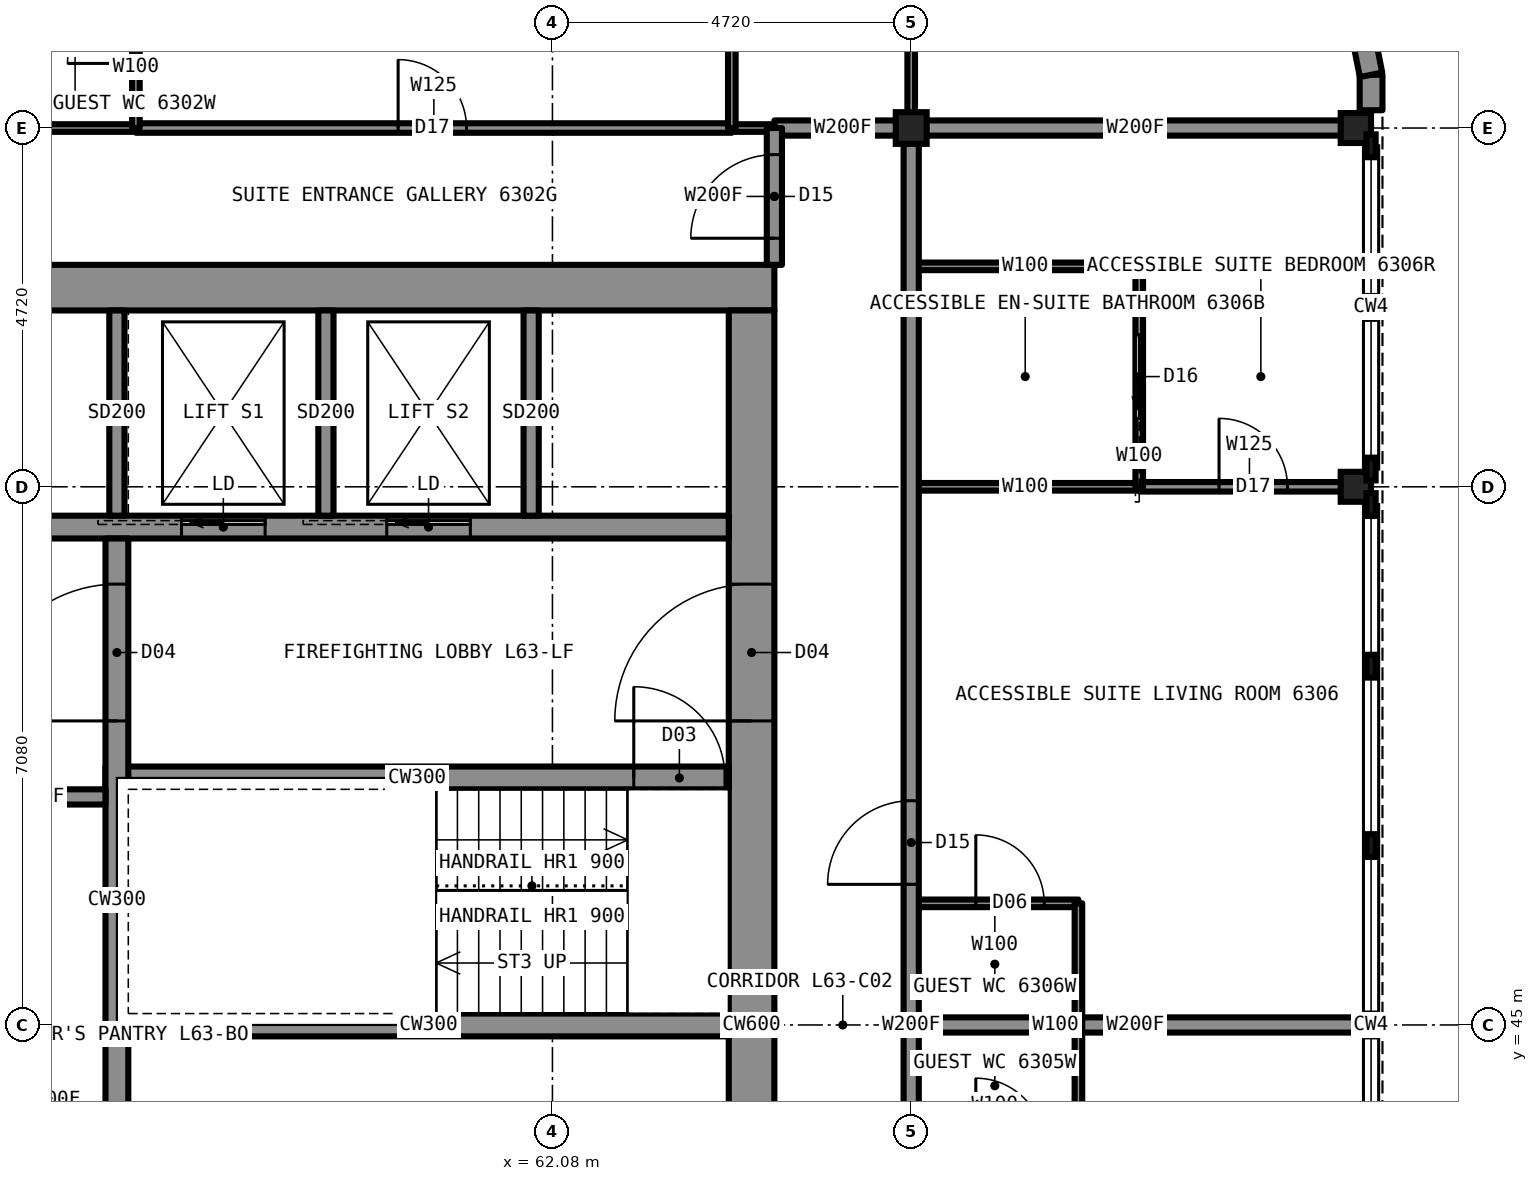
"""IFC4 building model, lengths in metres.
Left out: names, types, materials, properties, quantities, classifications, styles, units other than length and angle.
Written with IfcOpenShell. Run it as: python <this file> out.ifc"""

import sys

from ifc_helpers import new_model, si_unit, direction, frame, frame_2d, origin, origin_2d, place, context, subcontext, project, spatial, rectangle, i_section, extrude, element, fill, save


model = new_model("IFC4")
c1 = context("Model", 3, precision=1e-05, world=origin(), true_north=direction((0.0, 1.0)))
c2 = subcontext(c1, "Body", "Model", "MODEL_VIEW")
j1 = project(units=[si_unit("LENGTHUNIT", "METRE"), si_unit("PLANEANGLEUNIT", "RADIAN")], contexts=[c1])
p1 = place(None, origin())
s1 = spatial("IfcSite", under=j1, at=p1, CompositionType="ELEMENT")
p2 = place(p1, origin())
s2 = spatial("IfcBuilding", under=s1, at=p2, CompositionType="ELEMENT")
p3 = place(p2, frame((0.0, 0.0, 226.7)))
s3 = spatial("IfcBuildingStorey", under=s2, at=p3, CompositionType="ELEMENT", Elevation=226.7)
for number, where, z_axis, x_axis in (
    (1, (72.65, 52.08, 0.0), (0.0, 0.0, 1.0), (1.0, 0.0, 0.0)),
    (2, (72.65, 56.8, 0.0), (0.0, 0.0, 1.0), (1.0, 0.0, 0.0)),
):
    element("IfcColumn", number, at=place(p3, frame(where, z_axis=z_axis, x_axis=x_axis)), inside=s3, PredefinedType="COLUMN", context=c2, shape_type="SweptSolid", body=[
        extrude(i_section(OverallWidth=0.442, OverallDepth=0.531, WebThickness=0.066, FlangeThickness=0.106, at=origin_2d()), origin(), (0.0, 0.0, 1.0), 3.5),
    ])
p4 = place(p3, frame((66.8, 56.8, 0.0), z_axis=(0.0, 0.0, 1.0), x_axis=(1.0, 0.0, 0.0)))
e3 = element("IfcColumn", 3, at=p4, inside=s3, PredefinedType="COLUMN", context=c2, shape_type="SweptSolid", body=[
    extrude(i_section(OverallWidth=0.406, OverallDepth=0.417, WebThickness=0.03, FlangeThickness=0.048, at=origin_2d()), origin(), (0.0, 0.0, 1.0), 3.5),
])
p5 = place(p3, frame((45.0, 54.7, 0.0), z_axis=(0.0, 0.0, 1.0), x_axis=(1.0, 0.0, 0.0)))
e4 = element("IfcWall", 4, at=p5, inside=s3, PredefinedType="SHEAR", context=c2, shape_type="SweptSolid", body=[
    extrude(rectangle(XDim=20.0, YDim=0.6, at=frame_2d((10.0, 0.0))), origin(), (0.0, 0.0, 1.0), 3.5),
])
p6 = place(p3, frame((64.7, 35.6, 0.0), z_axis=(0.0, 0.0, 1.0), x_axis=(0.0, 1.0, 0.0)))
e5 = element("IfcWall", 5, at=p6, inside=s3, PredefinedType="SHEAR", context=c2, shape_type="SweptSolid", body=[
    extrude(rectangle(XDim=18.8, YDim=0.6, at=frame_2d((9.4, 0.0))), origin(), (0.0, 0.0, 1.0), 3.5),
])
p7 = place(p6, frame((13.4, 0.0, 0.0)))
e6 = element("IfcOpeningElement", 6, at=p7, cuts=e5, PredefinedType="OPENING", context=c2, shape_type="SweptSolid", body=[
    extrude(rectangle(XDim=1.8, YDim=2.2, at=frame_2d((0.9, 1.1))), frame((0.0, 0.31, 0.0), z_axis=(0.0, -1.0, 0.0), x_axis=(1.0, 0.0, 0.0)), (0.0, 0.0, 1.0), 0.62),
])
p8 = place(p6, frame((3.6, 0.0, 0.0)))
e7 = element("IfcOpeningElement", 7, at=p8, cuts=e5, PredefinedType="OPENING", context=c2, shape_type="SweptSolid", body=[
    extrude(rectangle(XDim=1.8, YDim=2.2, at=frame_2d((0.9, 1.1))), frame((0.0, 0.31, 0.0), z_axis=(0.0, -1.0, 0.0), x_axis=(1.0, 0.0, 0.0)), (0.0, 0.0, 1.0), 0.62),
])
p9 = place(p3, frame((45.6, 51.55, 0.0), z_axis=(0.0, 0.0, 1.0), x_axis=(1.0, 0.0, 0.0)))
e8 = element("IfcWall", 8, at=p9, inside=s3, PredefinedType="SHEAR", context=c2, shape_type="SweptSolid", body=[
    extrude(rectangle(XDim=18.8, YDim=0.3, at=frame_2d((9.4, 0.0))), origin(), (0.0, 0.0, 1.0), 3.5),
])
p10 = place(p9, frame((4.8, 0.0, 0.0)))
e9 = element("IfcOpeningElement", 9, at=p10, cuts=e8, PredefinedType="OPENING", context=c2, shape_type="SweptSolid", body=[
    extrude(rectangle(XDim=1.0, YDim=2.1, at=frame_2d((0.5, 1.05))), frame((0.0, 0.16, 0.0), z_axis=(0.0, -1.0, 0.0), x_axis=(1.0, 0.0, 0.0)), (0.0, 0.0, 1.0), 0.32),
])
p11 = place(p9, frame((11.6, 0.0, 0.0)))
e10 = element("IfcOpeningElement", 10, at=p11, cuts=e8, PredefinedType="OPENING", context=c2, shape_type="SweptSolid", body=[
    extrude(rectangle(XDim=1.1, YDim=2.2, at=frame_2d((0.55, 1.1))), frame((0.0, 0.16, 0.0), z_axis=(0.0, -1.0, 0.0), x_axis=(1.0, 0.0, 0.0)), (0.0, 0.0, 1.0), 0.32),
])
p12 = place(p9, frame((14.3, 0.0, 0.0)))
e11 = element("IfcOpeningElement", 11, at=p12, cuts=e8, PredefinedType="OPENING", context=c2, shape_type="SweptSolid", body=[
    extrude(rectangle(XDim=1.1, YDim=2.2, at=frame_2d((0.55, 1.1))), frame((0.0, 0.16, 0.0), z_axis=(0.0, -1.0, 0.0), x_axis=(1.0, 0.0, 0.0)), (0.0, 0.0, 1.0), 0.32),
])
p13 = place(p3, frame((56.2, 48.25, 0.0), z_axis=(0.0, 0.0, 1.0), x_axis=(1.0, 0.0, 0.0)))
e12 = element("IfcWall", 12, at=p13, inside=s3, PredefinedType="SHEAR", context=c2, shape_type="SweptSolid", body=[
    extrude(rectangle(XDim=8.2, YDim=0.3, at=frame_2d((4.1, 0.0))), origin(), (0.0, 0.0, 1.0), 3.5),
])
p14 = place(p13, frame((6.95, 0.0, 0.0)))
e13 = element("IfcOpeningElement", 13, at=p14, cuts=e12, PredefinedType="OPENING", context=c2, shape_type="SweptSolid", body=[
    extrude(rectangle(XDim=1.2, YDim=2.2, at=frame_2d((0.6, 1.1))), frame((0.0, 0.16, 0.0), z_axis=(0.0, -1.0, 0.0), x_axis=(1.0, 0.0, 0.0)), (0.0, 0.0, 1.0), 0.32),
])
p15 = place(p3, frame((56.35, 41.9, 0.0), z_axis=(0.0, 0.0, 1.0), x_axis=(0.0, 1.0, 0.0)))
e14 = element("IfcWall", 14, at=p15, inside=s3, PredefinedType="SHEAR", context=c2, shape_type="SweptSolid", body=[
    extrude(rectangle(XDim=9.5, YDim=0.3, at=frame_2d((4.75, 0.0))), origin(), (0.0, 0.0, 1.0), 3.5),
])
p16 = place(p15, frame((7.1, 0.0, 0.0)))
e15 = element("IfcOpeningElement", 15, at=p16, cuts=e14, PredefinedType="OPENING", context=c2, shape_type="SweptSolid", body=[
    extrude(rectangle(XDim=1.8, YDim=2.2, at=frame_2d((0.9, 1.1))), frame((0.0, 0.16, 0.0), z_axis=(0.0, -1.0, 0.0), x_axis=(1.0, 0.0, 0.0)), (0.0, 0.0, 1.0), 0.32),
])
p17 = place(p3, frame((56.5, 45.0, 0.0), z_axis=(0.0, 0.0, 1.0), x_axis=(1.0, 0.0, 0.0)))
e16 = element("IfcWall", 16, at=p17, inside=s3, PredefinedType="SHEAR", context=c2, shape_type="SweptSolid", body=[
    extrude(rectangle(XDim=7.9, YDim=0.3, at=frame_2d((3.95, 0.0))), origin(), (0.0, 0.0, 1.0), 3.5),
])
p18 = place(p3, frame((66.8, 45.0, 0.0), z_axis=(0.0, 0.0, 1.0), x_axis=(1.0, 0.0, 0.0)))
e17 = element("IfcWall", 17, at=p18, inside=s3, PredefinedType="PARTITIONING", context=c2, shape_type="SweptSolid", body=[
    extrude(rectangle(XDim=5.9, YDim=0.2, at=frame_2d((2.95, 0.0))), origin(), (0.0, 0.0, 1.0), 2.797),
])
p19 = place(p3, frame((66.8, 46.6, 0.0), z_axis=(0.0, 0.0, 1.0), x_axis=(1.0, 0.0, 0.0)))
e18 = element("IfcWall", 18, at=p19, inside=s3, PredefinedType="PARTITIONING", context=c2, shape_type="SweptSolid", body=[
    extrude(rectangle(XDim=2.2, YDim=0.1, at=frame_2d((1.1, 0.0))), origin(), (0.0, 0.0, 1.0), 3.33),
])
p20 = place(p19, frame((0.85, 0.0, 0.0)))
e19 = element("IfcOpeningElement", 19, at=p20, cuts=e18, PredefinedType="OPENING", context=c2, shape_type="SweptSolid", body=[
    extrude(rectangle(XDim=0.9, YDim=2.1, at=frame_2d((0.45, 1.05))), frame((0.0, 0.06, 0.0), z_axis=(0.0, -1.0, 0.0), x_axis=(1.0, 0.0, 0.0)), (0.0, 0.0, 1.0), 0.12),
])
p21 = place(p3, frame((53.4, 56.8, 0.0), z_axis=(0.0, 0.0, 1.0), x_axis=(1.0, 0.0, 0.0)))
e20 = element("IfcWall", 20, at=p21, inside=s3, PredefinedType="PARTITIONING", context=c2, shape_type="SweptSolid", body=[
    extrude(rectangle(XDim=3.2, YDim=0.1, at=frame_2d((1.6, 0.0))), origin(), (0.0, 0.0, 1.0), 3.33),
])
p22 = place(p3, frame((64.44, 56.8, 0.0), z_axis=(0.0, 0.0, 1.0), x_axis=(1.0, 0.0, 0.0)))
e21 = element("IfcWall", 21, at=p22, inside=s3, PredefinedType="PARTITIONING", context=c2, shape_type="SweptSolid", body=[
    extrude(rectangle(XDim=0.56, YDim=0.1, at=frame_2d((0.28, 0.0))), origin(), (0.0, 0.0, 1.0), 3.33),
])
p23 = place(p3, frame((65.0, 56.8, 0.0), z_axis=(0.0, 0.0, 1.0), x_axis=(1.0, 0.0, 0.0)))
e22 = element("IfcWall", 22, at=p23, inside=s3, PredefinedType="PARTITIONING", context=c2, shape_type="SweptSolid", body=[
    extrude(rectangle(XDim=1.8, YDim=0.2, at=frame_2d((0.9, 0.0))), origin(), (0.0, 0.0, 1.0), 3.33),
])
p24 = place(p3, frame((66.8, 56.8, 0.0), z_axis=(0.0, 0.0, 1.0), x_axis=(1.0, 0.0, 0.0)))
e23 = element("IfcWall", 23, at=p24, inside=s3, PredefinedType="PARTITIONING", context=c2, shape_type="SweptSolid", body=[
    extrude(rectangle(XDim=5.9, YDim=0.2, at=frame_2d((2.95, 0.0))), origin(), (0.0, 0.0, 1.0), 2.573),
])
p25 = place(p3, frame((56.6, 56.8, 0.0), z_axis=(0.0, 0.0, 1.0), x_axis=(1.0, 0.0, 0.0)))
e24 = element("IfcWall", 24, at=p25, inside=s3, PredefinedType="PARTITIONING", context=c2, shape_type="SweptSolid", body=[
    extrude(rectangle(XDim=7.84, YDim=0.125, at=frame_2d((3.92, 0.0))), origin(), (0.0, 0.0, 1.0), 3.33),
])
p26 = place(p25, frame((3.45, 0.0, 0.0)))
e25 = element("IfcOpeningElement", 25, at=p26, cuts=e24, PredefinedType="OPENING", context=c2, shape_type="SweptSolid", body=[
    extrude(rectangle(XDim=0.9, YDim=2.2, at=frame_2d((0.45, 1.1))), frame((0.0, 0.073, 0.0), z_axis=(0.0, -1.0, 0.0), x_axis=(1.0, 0.0, 0.0)), (0.0, 0.0, 1.0), 0.145),
])
p27 = place(p3, frame((66.8, 52.08, 0.0), z_axis=(0.0, 0.0, 1.0), x_axis=(1.0, 0.0, 0.0)))
e26 = element("IfcWall", 26, at=p27, inside=s3, PredefinedType="PARTITIONING", context=c2, shape_type="SweptSolid", body=[
    extrude(rectangle(XDim=3.0, YDim=0.1, at=frame_2d((1.5, 0.0))), origin(), (0.0, 0.0, 1.0), 2.573),
])
p28 = place(p3, frame((69.8, 52.08, 0.0), z_axis=(0.0, 0.0, 1.0), x_axis=(1.0, 0.0, 0.0)))
e27 = element("IfcWall", 27, at=p28, inside=s3, PredefinedType="PARTITIONING", context=c2, shape_type="SweptSolid", body=[
    extrude(rectangle(XDim=2.9, YDim=0.125, at=frame_2d((1.45, 0.0))), origin(), (0.0, 0.0, 1.0), 2.573),
])
p29 = place(p28, frame((1.05, 0.0, 0.0)))
e28 = element("IfcOpeningElement", 28, at=p29, cuts=e27, PredefinedType="OPENING", context=c2, shape_type="SweptSolid", body=[
    extrude(rectangle(XDim=0.9, YDim=2.2, at=frame_2d((0.45, 1.1))), frame((0.0, 0.073, 0.0), z_axis=(0.0, -1.0, 0.0), x_axis=(1.0, 0.0, 0.0)), (0.0, 0.0, 1.0), 0.145),
])
p30 = place(p3, frame((66.8, 54.98, 0.0), z_axis=(0.0, 0.0, 1.0), x_axis=(1.0, 0.0, 0.0)))
e29 = element("IfcWall", 29, at=p30, inside=s3, PredefinedType="PARTITIONING", context=c2, shape_type="SweptSolid", body=[
    extrude(rectangle(XDim=3.0, YDim=0.1, at=frame_2d((1.5, 0.0))), origin(), (0.0, 0.0, 1.0), 3.33),
])
p31 = place(p3, frame((56.6, 56.8, 0.0), z_axis=(0.0, 0.0, 1.0), x_axis=(0.0, 1.0, 0.0)))
e30 = element("IfcWall", 30, at=p31, inside=s3, PredefinedType="PARTITIONING", context=c2, shape_type="SweptSolid", body=[
    extrude(rectangle(XDim=2.2, YDim=0.1, at=frame_2d((1.1, 0.0))), origin(), (0.0, 0.0, 1.0), 3.33),
])
p32 = place(p31, frame((0.85, 0.0, 0.0)))
e31 = element("IfcOpeningElement", 31, at=p32, cuts=e30, PredefinedType="OPENING", context=c2, shape_type="SweptSolid", body=[
    extrude(rectangle(XDim=0.9, YDim=2.1, at=frame_2d((0.45, 1.05))), frame((0.0, 0.06, 0.0), z_axis=(0.0, -1.0, 0.0), x_axis=(1.0, 0.0, 0.0)), (0.0, 0.0, 1.0), 0.12),
])
p33 = place(p3, frame((65.0, 55.0, 0.0), z_axis=(0.0, 0.0, 1.0), x_axis=(0.0, 1.0, 0.0)))
e32 = element("IfcWall", 32, at=p33, inside=s3, PredefinedType="PARTITIONING", context=c2, shape_type="SweptSolid", body=[
    extrude(rectangle(XDim=1.8, YDim=0.2, at=frame_2d((0.9, 0.0))), origin(), (0.0, 0.0, 1.0), 3.33),
])
p34 = place(p33, frame((0.35, 0.0, 0.0)))
e33 = element("IfcOpeningElement", 33, at=p34, cuts=e32, PredefinedType="OPENING", context=c2, shape_type="SweptSolid", body=[
    extrude(rectangle(XDim=1.1, YDim=2.2, at=frame_2d((0.55, 1.1))), frame((0.0, 0.11, 0.0), z_axis=(0.0, -1.0, 0.0), x_axis=(1.0, 0.0, 0.0)), (0.0, 0.0, 1.0), 0.22),
])
p35 = place(p3, frame((66.8, 56.8, 0.0), z_axis=(0.0, 0.0, 1.0), x_axis=(0.0, 1.0, 0.0)))
e34 = element("IfcWall", 34, at=p35, inside=s3, PredefinedType="PARTITIONING", context=c2, shape_type="SweptSolid", body=[
    extrude(rectangle(XDim=2.8, YDim=0.1, at=frame_2d((1.4, 0.0))), origin(), (0.0, 0.0, 1.0), 2.573),
])
p36 = place(p3, frame((66.8, 33.2, 0.0), z_axis=(0.0, 0.0, 1.0), x_axis=(0.0, 1.0, 0.0)))
e35 = element("IfcWall", 35, at=p36, inside=s3, PredefinedType="PARTITIONING", context=c2, shape_type="SweptSolid", body=[
    extrude(rectangle(XDim=23.6, YDim=0.2, at=frame_2d((11.8, 0.0))), origin(), (0.0, 0.0, 1.0), 3.33),
])
p37 = place(p36, frame((8.85, 0.0, 0.0)))
e36 = element("IfcOpeningElement", 36, at=p37, cuts=e35, PredefinedType="OPENING", context=c2, shape_type="SweptSolid", body=[
    extrude(rectangle(XDim=1.1, YDim=2.2, at=frame_2d((0.55, 1.1))), frame((0.0, 0.11, 0.0), z_axis=(0.0, -1.0, 0.0), x_axis=(1.0, 0.0, 0.0)), (0.0, 0.0, 1.0), 0.22),
])
p38 = place(p36, frame((13.65, 0.0, 0.0)))
e37 = element("IfcOpeningElement", 37, at=p38, cuts=e35, PredefinedType="OPENING", context=c2, shape_type="SweptSolid", body=[
    extrude(rectangle(XDim=1.1, YDim=2.2, at=frame_2d((0.55, 1.1))), frame((0.0, 0.11, 0.0), z_axis=(0.0, -1.0, 0.0), x_axis=(1.0, 0.0, 0.0)), (0.0, 0.0, 1.0), 0.22),
])
p39 = place(p3, frame((69.0, 43.4, 0.0), z_axis=(0.0, 0.0, 1.0), x_axis=(0.0, 1.0, 0.0)))
e38 = element("IfcWall", 38, at=p39, inside=s3, PredefinedType="PARTITIONING", context=c2, shape_type="SweptSolid", body=[
    extrude(rectangle(XDim=3.2, YDim=0.1, at=frame_2d((1.6, 0.0))), origin(), (0.0, 0.0, 1.0), 3.33),
])
p40 = place(p3, frame((69.8, 52.08, 0.0), z_axis=(0.0, 0.0, 1.0), x_axis=(0.0, 1.0, 0.0)))
e39 = element("IfcWall", 39, at=p40, inside=s3, PredefinedType="PARTITIONING", context=c2, shape_type="SweptSolid", body=[
    extrude(rectangle(XDim=2.9, YDim=0.1, at=frame_2d((1.45, 0.0))), origin(), (0.0, 0.0, 1.0), 3.33),
])
p41 = place(p40, frame((0.9, 0.0, 0.0)))
e40 = element("IfcOpeningElement", 40, at=p41, cuts=e39, PredefinedType="OPENING", context=c2, shape_type="SweptSolid", body=[
    extrude(rectangle(XDim=1.1, YDim=2.1, at=frame_2d((0.55, 1.05))), frame((0.0, 0.06, 0.0), z_axis=(0.0, -1.0, 0.0), x_axis=(1.0, 0.0, 0.0)), (0.0, 0.0, 1.0), 0.12),
])
p42 = place(p3, frame((64.44, 56.8, 0.0), z_axis=(0.0, 0.0, 1.0), x_axis=(0.0, 1.0, 0.0)))
e41 = element("IfcWall", 41, at=p42, inside=s3, PredefinedType="PARTITIONING", context=c2, shape_type="SweptSolid", body=[
    extrude(rectangle(XDim=2.8, YDim=0.1, at=frame_2d((1.4, 0.0))), origin(), (0.0, 0.0, 1.0), 3.33),
])
for number, where, z_axis, x_axis in (
    (42, (54.35, 44.3, 0.0), (0.0, 0.0, 1.0), (1.0, 0.0, 0.0)),
    (43, (54.35, 44.7, 0.0), (0.0, 0.0, 1.0), (1.0, 0.0, 0.0)),
    (44, (54.35, 48.0, 0.0), (0.0, 0.0, 1.0), (1.0, 0.0, 0.0)),
):
    element("IfcWall", number, at=place(p3, frame(where, z_axis=z_axis, x_axis=x_axis)), inside=s3, PredefinedType="PARTITIONING", context=c2, shape_type="SweptSolid", body=[
        extrude(rectangle(XDim=1.85, YDim=0.2, at=frame_2d((0.925, 0.0))), origin(), (0.0, 0.0, 1.0), 3.33),
    ])
for number, where, z_axis, x_axis in (
    (45, (59.1, 51.7, 0.0), (0.0, 0.0, 1.0), (0.0, 1.0, 0.0)),
    (46, (61.8, 51.7, 0.0), (0.0, 0.0, 1.0), (0.0, 1.0, 0.0)),
    (47, (56.35, 51.7, 0.0), (0.0, 0.0, 1.0), (0.0, 1.0, 0.0)),
):
    element("IfcWall", number, at=place(p3, frame(where, z_axis=z_axis, x_axis=x_axis)), inside=s3, PredefinedType="PARTITIONING", context=c2, shape_type="SweptSolid", body=[
        extrude(rectangle(XDim=2.7, YDim=0.2, at=frame_2d((1.35, 0.0))), origin(), (0.0, 0.0, 1.0), 3.33),
    ])
p43 = place(p26, origin())
e48 = element("IfcDoor", 48, at=p43, inside=s3, OperationType="SINGLE_SWING_LEFT", PredefinedType="DOOR", context=c2, shape_type="SweptSolid", body=[
    extrude(rectangle(XDim=0.9, YDim=2.2, at=frame_2d((0.45, 1.1))), frame((0.0, 0.025, 0.0), z_axis=(0.0, -1.0, 0.0), x_axis=(1.0, 0.0, 0.0)), (0.0, 0.0, 1.0), 0.05),
])
fill(e25, e48)
p44 = place(p34, origin())
e49 = element("IfcDoor", 49, at=p44, inside=s3, OperationType="SINGLE_SWING_LEFT", PredefinedType="DOOR", context=c2, shape_type="SweptSolid", body=[
    extrude(rectangle(XDim=1.1, YDim=2.2, at=frame_2d((0.55, 1.1))), frame((0.0, 0.025, 0.0), z_axis=(0.0, -1.0, 0.0), x_axis=(1.0, 0.0, 0.0)), (0.0, 0.0, 1.0), 0.05),
])
fill(e33, e49)
p45 = place(p32, origin())
e50 = element("IfcDoor", 50, at=p45, inside=s3, OperationType="SINGLE_SWING_LEFT", PredefinedType="DOOR", context=c2, shape_type="SweptSolid", body=[
    extrude(rectangle(XDim=0.9, YDim=2.1, at=frame_2d((0.45, 1.05))), frame((0.0, 0.025, 0.0), z_axis=(0.0, -1.0, 0.0), x_axis=(1.0, 0.0, 0.0)), (0.0, 0.0, 1.0), 0.05),
])
fill(e31, e50)
p46 = place(p38, origin())
e51 = element("IfcDoor", 51, at=p46, inside=s3, OperationType="SINGLE_SWING_LEFT", PredefinedType="DOOR", context=c2, shape_type="SweptSolid", body=[
    extrude(rectangle(XDim=1.1, YDim=2.2, at=frame_2d((0.55, 1.1))), frame((0.0, 0.025, 0.0), z_axis=(0.0, -1.0, 0.0), x_axis=(1.0, 0.0, 0.0)), (0.0, 0.0, 1.0), 0.05),
])
fill(e37, e51)
p47 = place(p41, origin())
e52 = element("IfcDoor", 52, at=p47, inside=s3, OperationType="SLIDING_TO_LEFT", PredefinedType="DOOR", context=c2, shape_type="SweptSolid", body=[
    extrude(rectangle(XDim=1.1, YDim=2.1, at=frame_2d((0.55, 1.05))), frame((0.0, 0.025, 0.0), z_axis=(0.0, -1.0, 0.0), x_axis=(1.0, 0.0, 0.0)), (0.0, 0.0, 1.0), 0.05),
])
fill(e40, e52)
p48 = place(p29, origin())
e53 = element("IfcDoor", 53, at=p48, inside=s3, OperationType="SINGLE_SWING_LEFT", PredefinedType="DOOR", context=c2, shape_type="SweptSolid", body=[
    extrude(rectangle(XDim=0.9, YDim=2.2, at=frame_2d((0.45, 1.1))), frame((0.0, 0.025, 0.0), z_axis=(0.0, -1.0, 0.0), x_axis=(1.0, 0.0, 0.0)), (0.0, 0.0, 1.0), 0.05),
])
fill(e28, e53)
p49 = place(p20, origin())
e54 = element("IfcDoor", 54, at=p49, inside=s3, OperationType="SINGLE_SWING_LEFT", PredefinedType="DOOR", context=c2, shape_type="SweptSolid", body=[
    extrude(rectangle(XDim=0.9, YDim=2.1, at=frame_2d((0.45, 1.05))), frame((0.0, 0.025, 0.0), z_axis=(0.0, -1.0, 0.0), x_axis=(1.0, 0.0, 0.0)), (0.0, 0.0, 1.0), 0.05),
])
fill(e19, e54)
p50 = place(p7, origin())
e55 = element("IfcDoor", 55, at=p50, inside=s3, OperationType="DOUBLE_DOOR_SINGLE_SWING", PredefinedType="DOOR", context=c2, shape_type="SweptSolid", body=[
    extrude(rectangle(XDim=1.8, YDim=2.2, at=frame_2d((0.9, 1.1))), frame((0.0, 0.025, 0.0), z_axis=(0.0, -1.0, 0.0), x_axis=(1.0, 0.0, 0.0)), (0.0, 0.0, 1.0), 0.05),
])
fill(e6, e55)
p51 = place(p16, origin())
e56 = element("IfcDoor", 56, at=p51, inside=s3, OperationType="DOUBLE_DOOR_SINGLE_SWING", PredefinedType="DOOR", context=c2, shape_type="SweptSolid", body=[
    extrude(rectangle(XDim=1.8, YDim=2.2, at=frame_2d((0.9, 1.1))), frame((0.0, 0.025, 0.0), z_axis=(0.0, -1.0, 0.0), x_axis=(1.0, 0.0, 0.0)), (0.0, 0.0, 1.0), 0.05),
])
fill(e15, e56)
p52 = place(p14, origin())
e57 = element("IfcDoor", 57, at=p52, inside=s3, OperationType="SINGLE_SWING_LEFT", PredefinedType="DOOR", context=c2, shape_type="SweptSolid", body=[
    extrude(rectangle(XDim=1.2, YDim=2.2, at=frame_2d((0.6, 1.1))), frame((0.0, 0.025, 0.0), z_axis=(0.0, -1.0, 0.0), x_axis=(1.0, 0.0, 0.0)), (0.0, 0.0, 1.0), 0.05),
])
fill(e13, e57)
p53 = place(p11, origin())
e58 = element("IfcDoor", 58, at=p53, inside=s3, OperationType="SLIDING_TO_LEFT", PredefinedType="DOOR", context=c2, shape_type="SweptSolid", body=[
    extrude(rectangle(XDim=1.1, YDim=2.2, at=frame_2d((0.55, 1.1))), frame((0.0, 0.025, 0.0), z_axis=(0.0, -1.0, 0.0), x_axis=(1.0, 0.0, 0.0)), (0.0, 0.0, 1.0), 0.05),
])
fill(e10, e58)
p54 = place(p12, origin())
e59 = element("IfcDoor", 59, at=p54, inside=s3, OperationType="SLIDING_TO_LEFT", PredefinedType="DOOR", context=c2, shape_type="SweptSolid", body=[
    extrude(rectangle(XDim=1.1, YDim=2.2, at=frame_2d((0.55, 1.1))), frame((0.0, 0.025, 0.0), z_axis=(0.0, -1.0, 0.0), x_axis=(1.0, 0.0, 0.0)), (0.0, 0.0, 1.0), 0.05),
])
fill(e11, e59)
save(model, sys.argv[1])
